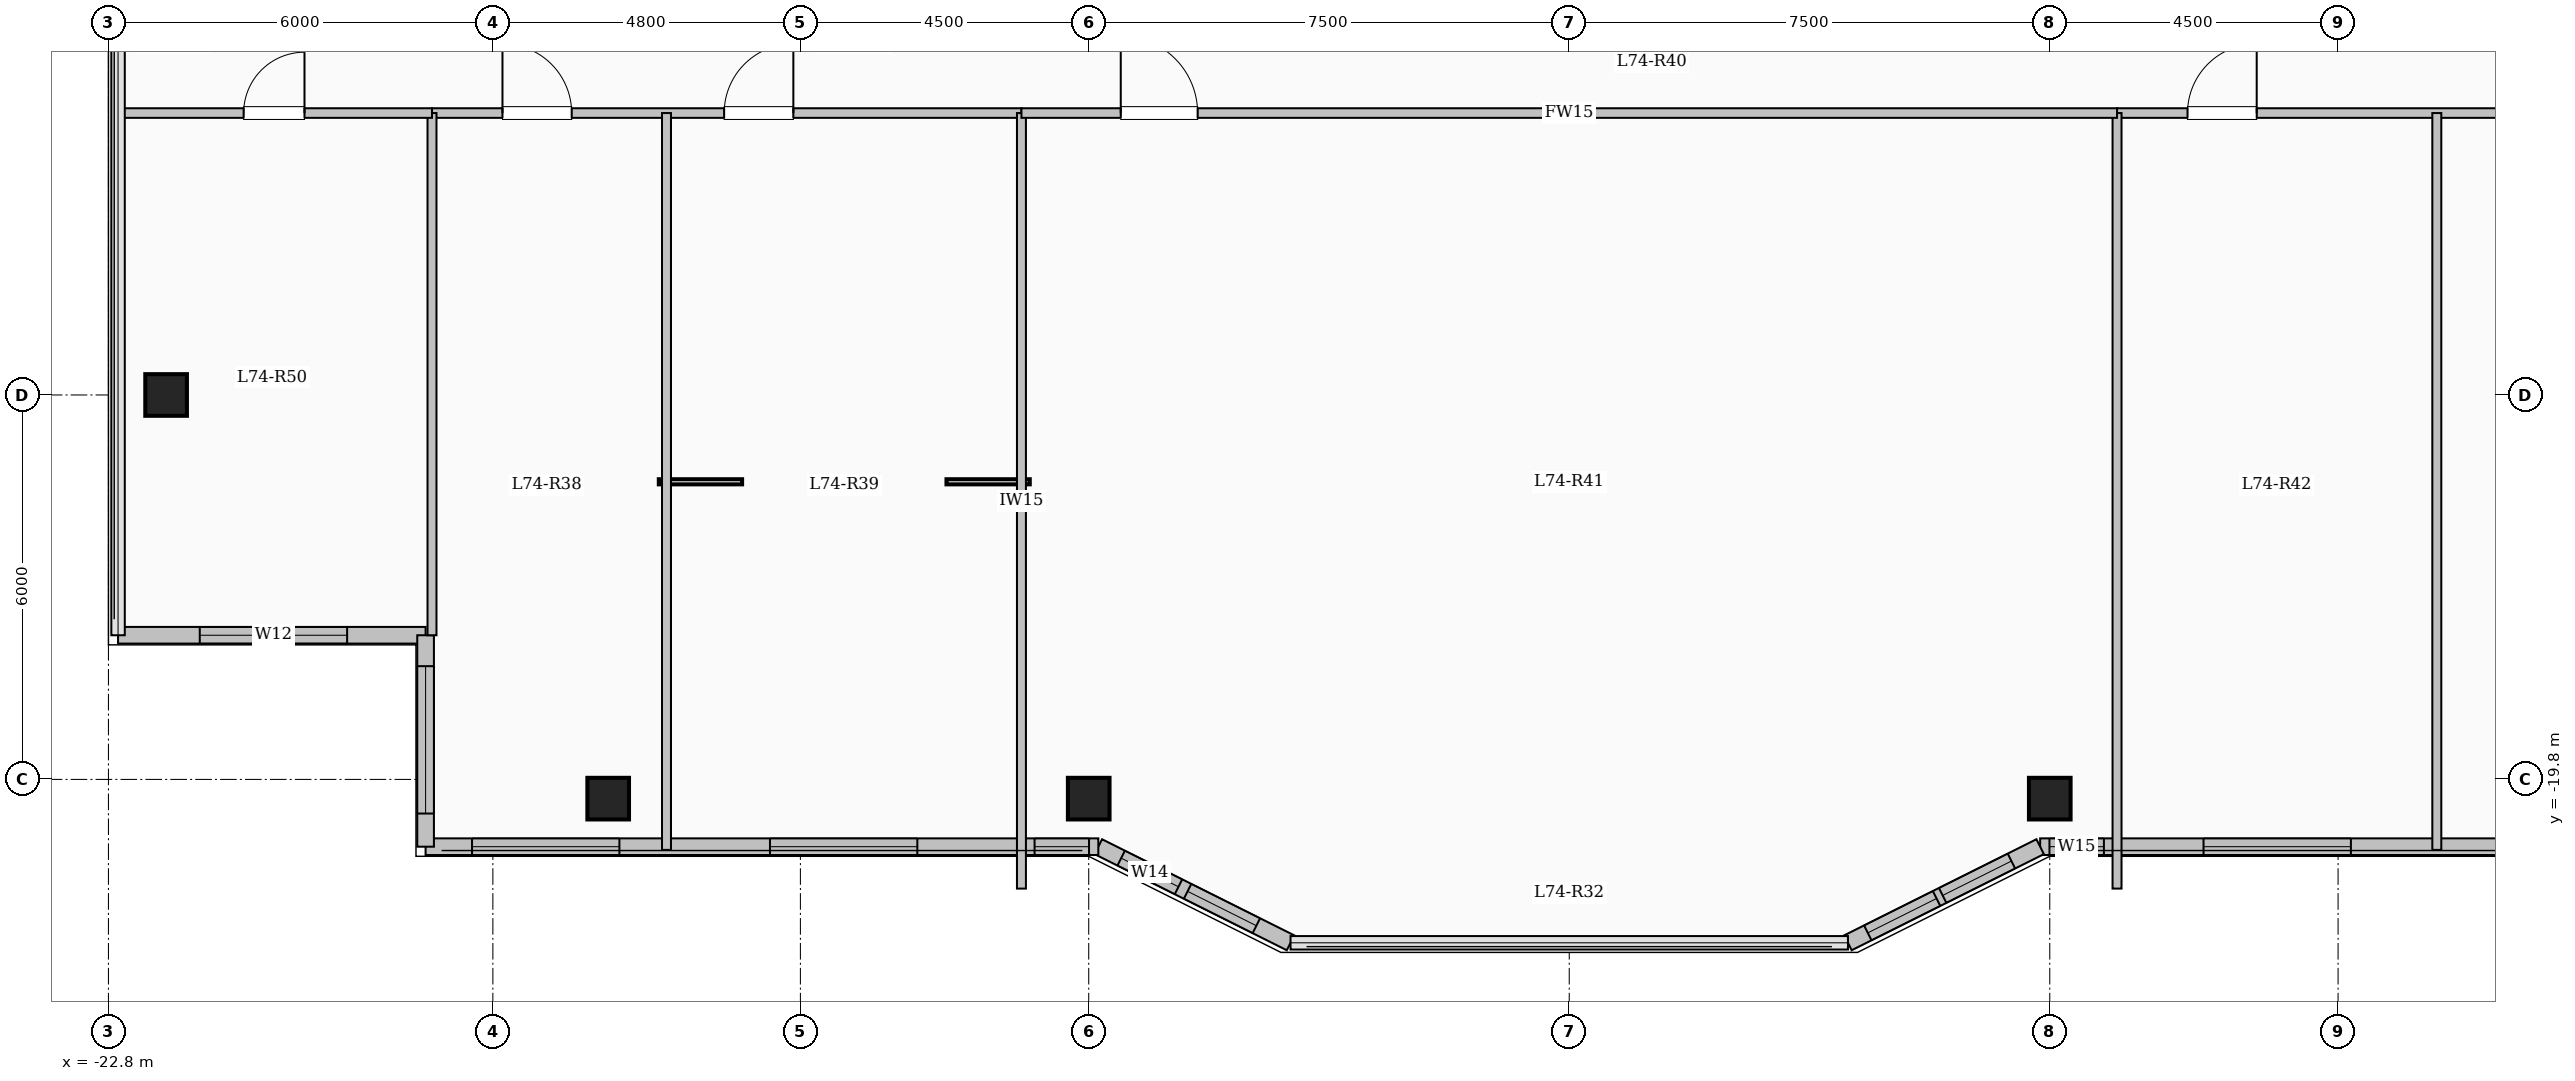
"""IFC4 building model, lengths in metres.
Left out: names, types, materials, properties, quantities, classifications, styles, units other than length and angle.
Written with IfcOpenShell. Run it as: python <this file> out.ifc"""

import sys

from ifc_helpers import new_model, si_unit, direction, frame, frame_2d, origin, origin_2d, place, context, subcontext, project, spatial, rectangle, extrude, element, fill, save


model = new_model("IFC4")
c1 = context("Model", 3, precision=1e-05, world=origin(), true_north=direction((0.0, 1.0)))
c2 = subcontext(c1, "Body", "Model", "MODEL_VIEW")
j1 = project(units=[si_unit("LENGTHUNIT", "METRE"), si_unit("PLANEANGLEUNIT", "RADIAN")], contexts=[c1])
p1 = place(None, origin())
s1 = spatial("IfcSite", under=j1, at=p1, CompositionType="ELEMENT")
p2 = place(p1, origin())
s2 = spatial("IfcBuilding", under=s1, at=p2, CompositionType="ELEMENT")
p3 = place(p2, frame((0.0, 0.0, 271.65)))
s3 = spatial("IfcBuildingStorey", under=s2, at=p3, CompositionType="ELEMENT", Elevation=271.65)
for number, where, z_axis, x_axis in (
    (1, (-15.0, -20.1, 0.0), (0.0, 0.0, 1.0), (1.0, 0.0, 0.0)),
    (2, (-7.5, -20.1, 0.0), (0.0, 0.0, 1.0), (1.0, 0.0, 0.0)),
    (3, (7.5, -20.1, 0.0), (0.0, 0.0, 1.0), (1.0, 0.0, 0.0)),
    (4, (-21.9, -13.8, 0.0), (0.0, 0.0, 1.0), (1.0, 0.0, 0.0)),
):
    element("IfcColumn", number, at=place(p3, frame(where, z_axis=z_axis, x_axis=x_axis)), inside=s3, PredefinedType="COLUMN", context=c2, shape_type="SweptSolid", body=[
        extrude(rectangle(XDim=0.65, YDim=0.65, at=origin_2d()), origin(), (0.0, 0.0, 1.0), 4.65),
    ])
p4 = place(p3, frame((-17.85, -17.55, 0.0), z_axis=(0.0, 0.0, 1.0), x_axis=(-1.0, 0.0, 0.0)))
e5 = element("IfcWall", 5, at=p4, inside=s3, PredefinedType="SOLIDWALL", context=c2, shape_type="SweptSolid", body=[
    extrude(rectangle(XDim=4.8, YDim=0.26, at=frame_2d((2.4, 0.0))), origin(), (0.0, 0.0, 1.0), 4.35),
])
p5 = place(p4, frame((1.225, 0.0, 0.85)))
e6 = element("IfcOpeningElement", 6, at=p5, cuts=e5, PredefinedType="OPENING", context=c2, shape_type="SweptSolid", body=[
    extrude(rectangle(XDim=2.3, YDim=2.2, at=frame_2d((1.15, 1.1))), frame((0.0, 0.14, 0.0), z_axis=(0.0, -1.0, 0.0), x_axis=(1.0, 0.0, 0.0)), (0.0, 0.0, 1.0), 0.28),
])
p6 = place(p3, frame((17.85, -20.85, 0.0), z_axis=(0.0, 0.0, 1.0), x_axis=(-1.0, 0.0, 0.0)))
e7 = element("IfcWall", 7, at=p6, inside=s3, PredefinedType="SOLIDWALL", context=c2, shape_type="SweptSolid", body=[
    extrude(rectangle(XDim=10.5, YDim=0.26, at=frame_2d((5.25, 0.0))), origin(), (0.0, 0.0, 1.0), 4.35),
])
p7 = place(p6, frame((1.0, 0.0, 0.85)))
e8 = element("IfcOpeningElement", 8, at=p7, cuts=e7, PredefinedType="OPENING", context=c2, shape_type="SweptSolid", body=[
    extrude(rectangle(XDim=2.3, YDim=2.2, at=frame_2d((1.15, 1.1))), frame((0.0, 0.14, 0.0), z_axis=(0.0, -1.0, 0.0), x_axis=(1.0, 0.0, 0.0)), (0.0, 0.0, 1.0), 0.28),
])
p8 = place(p6, frame((5.65, 0.0, 0.85)))
e9 = element("IfcOpeningElement", 9, at=p8, cuts=e7, PredefinedType="OPENING", context=c2, shape_type="SweptSolid", body=[
    extrude(rectangle(XDim=2.3, YDim=2.2, at=frame_2d((1.15, 1.1))), frame((0.0, 0.14, 0.0), z_axis=(0.0, -1.0, 0.0), x_axis=(1.0, 0.0, 0.0)), (0.0, 0.0, 1.0), 0.28),
])
p9 = place(p6, frame((9.505, 0.0, 0.95)))
e10 = element("IfcOpeningElement", 10, at=p9, cuts=e7, PredefinedType="OPENING", context=c2, shape_type="SweptSolid", body=[
    extrude(rectangle(XDim=0.85, YDim=1.5, at=frame_2d((0.425, 0.75))), frame((0.0, 0.14, 0.0), z_axis=(0.0, -1.0, 0.0), x_axis=(1.0, 0.0, 0.0)), (0.0, 0.0, 1.0), 0.28),
])
p10 = place(p3, frame((7.35, -20.85, 0.0), z_axis=(0.0, 0.0, 1.0), x_axis=(-0.894427191, -0.4472135955, 0.0)))
e11 = element("IfcWall", 11, at=p10, inside=s3, PredefinedType="SOLIDWALL", context=c2, shape_type="SweptSolid", body=[
    extrude(rectangle(XDim=3.354, YDim=0.26, at=frame_2d((1.677, 0.0))), origin(), (0.0, 0.0, 1.0), 4.35),
])
p11 = place(p10, frame((0.501, 0.0, 0.95)))
e12 = element("IfcOpeningElement", 12, at=p11, cuts=e11, PredefinedType="OPENING", context=c2, shape_type="SweptSolid", body=[
    extrude(rectangle(XDim=1.2, YDim=1.5, at=frame_2d((0.6, 0.75))), frame((0.0, 0.14, 0.0), z_axis=(0.0, -1.0, 0.0), x_axis=(1.0, 0.0, 0.0)), (0.0, 0.0, 1.0), 0.28),
])
p12 = place(p10, frame((1.808, 0.0, 0.95)))
e13 = element("IfcOpeningElement", 13, at=p12, cuts=e11, PredefinedType="OPENING", context=c2, shape_type="SweptSolid", body=[
    extrude(rectangle(XDim=1.2, YDim=1.5, at=frame_2d((0.6, 0.75))), frame((0.0, 0.14, 0.0), z_axis=(0.0, -1.0, 0.0), x_axis=(1.0, 0.0, 0.0)), (0.0, 0.0, 1.0), 0.28),
])
p13 = place(p3, frame((-4.35, -22.35, 0.0), z_axis=(0.0, 0.0, 1.0), x_axis=(-0.894427191, 0.4472135955, 0.0)))
e14 = element("IfcWall", 14, at=p13, inside=s3, PredefinedType="SOLIDWALL", context=c2, shape_type="SweptSolid", body=[
    extrude(rectangle(XDim=3.354, YDim=0.26, at=frame_2d((1.677, 0.0))), origin(), (0.0, 0.0, 1.0), 4.35),
])
p14 = place(p13, frame((0.596, 0.0, 0.95)))
e15 = element("IfcOpeningElement", 15, at=p14, cuts=e14, PredefinedType="OPENING", context=c2, shape_type="SweptSolid", body=[
    extrude(rectangle(XDim=1.2, YDim=1.5, at=frame_2d((0.6, 0.75))), frame((0.0, 0.14, 0.0), z_axis=(0.0, -1.0, 0.0), x_axis=(1.0, 0.0, 0.0)), (0.0, 0.0, 1.0), 0.28),
])
p15 = place(p13, frame((1.955, 0.0, 0.95)))
e16 = element("IfcOpeningElement", 16, at=p15, cuts=e14, PredefinedType="OPENING", context=c2, shape_type="SweptSolid", body=[
    extrude(rectangle(XDim=1.0, YDim=1.5, at=frame_2d((0.5, 0.75))), frame((0.0, 0.14, 0.0), z_axis=(0.0, -1.0, 0.0), x_axis=(1.0, 0.0, 0.0)), (0.0, 0.0, 1.0), 0.28),
])
p16 = place(p3, frame((-7.35, -20.85, 0.0), z_axis=(0.0, 0.0, 1.0), x_axis=(-1.0, 0.0, 0.0)))
e17 = element("IfcWall", 17, at=p16, inside=s3, PredefinedType="SOLIDWALL", context=c2, shape_type="SweptSolid", body=[
    extrude(rectangle(XDim=10.5, YDim=0.26, at=frame_2d((5.25, 0.0))), origin(), (0.0, 0.0, 1.0), 4.35),
])
p17 = place(p16, frame((0.145, 0.0, 0.95)))
e18 = element("IfcOpeningElement", 18, at=p17, cuts=e17, PredefinedType="OPENING", context=c2, shape_type="SweptSolid", body=[
    extrude(rectangle(XDim=0.85, YDim=1.5, at=frame_2d((0.425, 0.75))), frame((0.0, 0.14, 0.0), z_axis=(0.0, -1.0, 0.0), x_axis=(1.0, 0.0, 0.0)), (0.0, 0.0, 1.0), 0.28),
])
p18 = place(p16, frame((2.825, 0.0, 0.85)))
e19 = element("IfcOpeningElement", 19, at=p18, cuts=e17, PredefinedType="OPENING", context=c2, shape_type="SweptSolid", body=[
    extrude(rectangle(XDim=2.3, YDim=2.2, at=frame_2d((1.15, 1.1))), frame((0.0, 0.14, 0.0), z_axis=(0.0, -1.0, 0.0), x_axis=(1.0, 0.0, 0.0)), (0.0, 0.0, 1.0), 0.28),
])
p19 = place(p16, frame((7.475, 0.0, 0.85)))
e20 = element("IfcOpeningElement", 20, at=p19, cuts=e17, PredefinedType="OPENING", context=c2, shape_type="SweptSolid", body=[
    extrude(rectangle(XDim=2.3, YDim=2.2, at=frame_2d((1.15, 1.1))), frame((0.0, 0.14, 0.0), z_axis=(0.0, -1.0, 0.0), x_axis=(1.0, 0.0, 0.0)), (0.0, 0.0, 1.0), 0.28),
])
p20 = place(p3, frame((-17.85, -20.85, 0.0), z_axis=(0.0, 0.0, 1.0), x_axis=(0.0, 1.0, 0.0)))
e21 = element("IfcWall", 21, at=p20, inside=s3, PredefinedType="SOLIDWALL", context=c2, shape_type="SweptSolid", body=[
    extrude(rectangle(XDim=3.3, YDim=0.26, at=frame_2d((1.65, 0.0))), origin(), (0.0, 0.0, 1.0), 4.35),
])
p21 = place(p20, frame((0.518, 0.0, 0.85)))
e22 = element("IfcOpeningElement", 22, at=p21, cuts=e21, PredefinedType="OPENING", context=c2, shape_type="SweptSolid", body=[
    extrude(rectangle(XDim=2.3, YDim=2.2, at=frame_2d((1.15, 1.1))), frame((0.0, 0.14, 0.0), z_axis=(0.0, -1.0, 0.0), x_axis=(1.0, 0.0, 0.0)), (0.0, 0.0, 1.0), 0.28),
])
p22 = place(p3, frame((-17.75, -9.4, 0.0), z_axis=(0.0, 0.0, 1.0), x_axis=(1.0, 0.0, 0.0)))
e23 = element("IfcWall", 23, at=p22, inside=s3, PredefinedType="PARTITIONING", context=c2, shape_type="SweptSolid", body=[
    extrude(rectangle(XDim=9.2, YDim=0.15, at=frame_2d((4.6, 0.0))), origin(), (0.0, 0.0, 1.0), 4.35),
])
p23 = place(p22, frame((1.1, 0.0, 0.0)))
e24 = element("IfcOpeningElement", 24, at=p23, cuts=e23, PredefinedType="OPENING", context=c2, shape_type="SweptSolid", body=[
    extrude(rectangle(XDim=1.08, YDim=2.15, at=frame_2d((0.54, 1.075))), frame((0.0, 0.085, 0.0), z_axis=(0.0, -1.0, 0.0), x_axis=(1.0, 0.0, 0.0)), (0.0, 0.0, 1.0), 0.17),
])
p24 = place(p22, frame((4.56, 0.0, 0.0)))
e25 = element("IfcOpeningElement", 25, at=p24, cuts=e23, PredefinedType="OPENING", context=c2, shape_type="SweptSolid", body=[
    extrude(rectangle(XDim=1.08, YDim=2.15, at=frame_2d((0.54, 1.075))), frame((0.0, 0.085, 0.0), z_axis=(0.0, -1.0, 0.0), x_axis=(1.0, 0.0, 0.0)), (0.0, 0.0, 1.0), 0.17),
])
p25 = place(p3, frame((8.55, -9.4, 0.0), z_axis=(0.0, 0.0, 1.0), x_axis=(1.0, 0.0, 0.0)))
e26 = element("IfcWall", 26, at=p25, inside=s3, PredefinedType="PARTITIONING", context=c2, shape_type="SweptSolid", body=[
    extrude(rectangle(XDim=9.2, YDim=0.15, at=frame_2d((4.6, 0.0))), origin(), (0.0, 0.0, 1.0), 4.35),
])
p26 = place(p25, frame((1.1, 0.0, 0.0)))
e27 = element("IfcOpeningElement", 27, at=p26, cuts=e26, PredefinedType="OPENING", context=c2, shape_type="SweptSolid", body=[
    extrude(rectangle(XDim=1.08, YDim=2.15, at=frame_2d((0.54, 1.075))), frame((0.0, 0.085, 0.0), z_axis=(0.0, -1.0, 0.0), x_axis=(1.0, 0.0, 0.0)), (0.0, 0.0, 1.0), 0.17),
])
p27 = place(p25, frame((5.991, 0.0, 0.0)))
e28 = element("IfcOpeningElement", 28, at=p27, cuts=e26, PredefinedType="OPENING", context=c2, shape_type="SweptSolid", body=[
    extrude(rectangle(XDim=1.2, YDim=2.15, at=frame_2d((0.6, 1.075))), frame((0.0, 0.085, 0.0), z_axis=(0.0, -1.0, 0.0), x_axis=(1.0, 0.0, 0.0)), (0.0, 0.0, 1.0), 0.17),
])
p28 = place(p3, frame((-14.09, -20.9, 0.0), z_axis=(0.0, 0.0, 1.0), x_axis=(0.0, 1.0, 0.0)))
e29 = element("IfcWall", 29, at=p28, inside=s3, PredefinedType="PARTITIONING", context=c2, shape_type="SweptSolid", body=[
    extrude(rectangle(XDim=11.5, YDim=0.14, at=frame_2d((5.75, 0.0))), origin(), (0.0, 0.0, 1.0), 4.35),
])
for number, where, z_axis, x_axis in (
    (30, (-8.55, -21.504, 0.0), (0.0, 0.0, 1.0), (0.0, 1.0, 0.0)),
    (31, (8.55, -21.504, 0.0), (0.0, 0.0, 1.0), (0.0, 1.0, 0.0)),
):
    element("IfcWall", number, at=place(p3, frame(where, z_axis=z_axis, x_axis=x_axis)), inside=s3, PredefinedType="PARTITIONING", context=c2, shape_type="SweptSolid", body=[
        extrude(rectangle(XDim=12.104, YDim=0.14, at=frame_2d((6.052, 0.0))), origin(), (0.0, 0.0, 1.0), 4.35),
    ])
p29 = place(p3, frame((13.541, -20.9, 0.0), z_axis=(0.0, 0.0, 1.0), x_axis=(0.0, 1.0, 0.0)))
e32 = element("IfcWall", 32, at=p29, inside=s3, PredefinedType="PARTITIONING", context=c2, shape_type="SweptSolid", body=[
    extrude(rectangle(XDim=11.5, YDim=0.14, at=frame_2d((5.75, 0.0))), origin(), (0.0, 0.0, 1.0), 4.35),
])
p30 = place(p3, frame((-8.55, -9.4, 0.0), z_axis=(0.0, 0.0, 1.0), x_axis=(1.0, 0.0, 0.0)))
e33 = element("IfcWall", 33, at=p30, inside=s3, PredefinedType="PARTITIONING", context=c2, shape_type="SweptSolid", body=[
    extrude(rectangle(XDim=17.1, YDim=0.15, at=frame_2d((8.55, 0.0))), origin(), (0.0, 0.0, 1.0), 4.35),
])
p31 = place(p30, frame((1.55, 0.0, 0.0)))
e34 = element("IfcOpeningElement", 34, at=p31, cuts=e33, PredefinedType="OPENING", context=c2, shape_type="SweptSolid", body=[
    extrude(rectangle(XDim=1.2, YDim=2.15, at=frame_2d((0.6, 1.075))), frame((0.0, 0.085, 0.0), z_axis=(0.0, -1.0, 0.0), x_axis=(1.0, 0.0, 0.0)), (0.0, 0.0, 1.0), 0.17),
])
p32 = place(p3, frame((-17.75, -17.55, 0.0), z_axis=(0.0, 0.0, 1.0), x_axis=(0.0, 1.0, 0.0)))
e35 = element("IfcWall", 35, at=p32, inside=s3, PredefinedType="PARTITIONING", context=c2, shape_type="SweptSolid", body=[
    extrude(rectangle(XDim=8.15, YDim=0.14, at=frame_2d((4.075, 0.0))), origin(), (0.0, 0.0, 1.0), 4.35),
])
p33 = place(p3, frame((-22.68, -9.4, 0.0), z_axis=(0.0, 0.0, 1.0), x_axis=(1.0, 0.0, 0.0)))
e36 = element("IfcWall", 36, at=p33, inside=s3, PredefinedType="PARTITIONING", context=c2, shape_type="SweptSolid", body=[
    extrude(rectangle(XDim=4.93, YDim=0.15, at=frame_2d((2.465, 0.0))), origin(), (0.0, 0.0, 1.0), 4.35),
])
p34 = place(p33, frame((1.99, 0.0, 0.0)))
e37 = element("IfcOpeningElement", 37, at=p34, cuts=e36, PredefinedType="OPENING", context=c2, shape_type="SweptSolid", body=[
    extrude(rectangle(XDim=0.95, YDim=2.15, at=frame_2d((0.475, 1.075))), frame((0.0, 0.085, 0.0), z_axis=(0.0, -1.0, 0.0), x_axis=(1.0, 0.0, 0.0)), (0.0, 0.0, 1.0), 0.17),
])
p35 = place(p5, origin())
e38 = element("IfcWindow", 38, at=p35, inside=s3, PartitioningType="SINGLE_PANEL", PredefinedType="WINDOW", context=c2, shape_type="SweptSolid", body=[
    extrude(rectangle(XDim=2.3, YDim=2.2, at=frame_2d((1.15, 1.1))), frame((0.0, 0.03, 0.0), z_axis=(0.0, -1.0, 0.0), x_axis=(1.0, 0.0, 0.0)), (0.0, 0.0, 1.0), 0.06),
])
fill(e6, e38)
p36 = place(p8, origin())
e39 = element("IfcWindow", 39, at=p36, inside=s3, PartitioningType="SINGLE_PANEL", PredefinedType="WINDOW", context=c2, shape_type="SweptSolid", body=[
    extrude(rectangle(XDim=2.3, YDim=2.2, at=frame_2d((1.15, 1.1))), frame((0.0, 0.03, 0.0), z_axis=(0.0, -1.0, 0.0), x_axis=(1.0, 0.0, 0.0)), (0.0, 0.0, 1.0), 0.06),
])
fill(e9, e39)
p37 = place(p9, origin())
e40 = element("IfcWindow", 40, at=p37, inside=s3, PartitioningType="SINGLE_PANEL", PredefinedType="WINDOW", context=c2, shape_type="SweptSolid", body=[
    extrude(rectangle(XDim=0.85, YDim=1.5, at=frame_2d((0.425, 0.75))), frame((0.0, 0.03, 0.0), z_axis=(0.0, -1.0, 0.0), x_axis=(1.0, 0.0, 0.0)), (0.0, 0.0, 1.0), 0.06),
])
fill(e10, e40)
p38 = place(p11, origin())
e41 = element("IfcWindow", 41, at=p38, inside=s3, PartitioningType="SINGLE_PANEL", PredefinedType="WINDOW", context=c2, shape_type="SweptSolid", body=[
    extrude(rectangle(XDim=1.2, YDim=1.5, at=frame_2d((0.6, 0.75))), frame((0.0, 0.03, 0.0), z_axis=(0.0, -1.0, 0.0), x_axis=(1.0, 0.0, 0.0)), (0.0, 0.0, 1.0), 0.06),
])
fill(e12, e41)
p39 = place(p12, origin())
e42 = element("IfcWindow", 42, at=p39, inside=s3, PartitioningType="SINGLE_PANEL", PredefinedType="WINDOW", context=c2, shape_type="SweptSolid", body=[
    extrude(rectangle(XDim=1.2, YDim=1.5, at=frame_2d((0.6, 0.75))), frame((0.0, 0.03, 0.0), z_axis=(0.0, -1.0, 0.0), x_axis=(1.0, 0.0, 0.0)), (0.0, 0.0, 1.0), 0.06),
])
fill(e13, e42)
p40 = place(p14, origin())
e43 = element("IfcWindow", 43, at=p40, inside=s3, PartitioningType="SINGLE_PANEL", PredefinedType="WINDOW", context=c2, shape_type="SweptSolid", body=[
    extrude(rectangle(XDim=1.2, YDim=1.5, at=frame_2d((0.6, 0.75))), frame((0.0, 0.03, 0.0), z_axis=(0.0, -1.0, 0.0), x_axis=(1.0, 0.0, 0.0)), (0.0, 0.0, 1.0), 0.06),
])
fill(e15, e43)
p41 = place(p15, origin())
e44 = element("IfcWindow", 44, at=p41, inside=s3, PartitioningType="SINGLE_PANEL", PredefinedType="WINDOW", context=c2, shape_type="SweptSolid", body=[
    extrude(rectangle(XDim=1.0, YDim=1.5, at=frame_2d((0.5, 0.75))), frame((0.0, 0.03, 0.0), z_axis=(0.0, -1.0, 0.0), x_axis=(1.0, 0.0, 0.0)), (0.0, 0.0, 1.0), 0.06),
])
fill(e16, e44)
p42 = place(p17, origin())
e45 = element("IfcWindow", 45, at=p42, inside=s3, PartitioningType="SINGLE_PANEL", PredefinedType="WINDOW", context=c2, shape_type="SweptSolid", body=[
    extrude(rectangle(XDim=0.85, YDim=1.5, at=frame_2d((0.425, 0.75))), frame((0.0, 0.03, 0.0), z_axis=(0.0, -1.0, 0.0), x_axis=(1.0, 0.0, 0.0)), (0.0, 0.0, 1.0), 0.06),
])
fill(e18, e45)
p43 = place(p18, origin())
e46 = element("IfcWindow", 46, at=p43, inside=s3, PartitioningType="SINGLE_PANEL", PredefinedType="WINDOW", context=c2, shape_type="SweptSolid", body=[
    extrude(rectangle(XDim=2.3, YDim=2.2, at=frame_2d((1.15, 1.1))), frame((0.0, 0.03, 0.0), z_axis=(0.0, -1.0, 0.0), x_axis=(1.0, 0.0, 0.0)), (0.0, 0.0, 1.0), 0.06),
])
fill(e19, e46)
p44 = place(p19, origin())
e47 = element("IfcWindow", 47, at=p44, inside=s3, PartitioningType="SINGLE_PANEL", PredefinedType="WINDOW", context=c2, shape_type="SweptSolid", body=[
    extrude(rectangle(XDim=2.3, YDim=2.2, at=frame_2d((1.15, 1.1))), frame((0.0, 0.03, 0.0), z_axis=(0.0, -1.0, 0.0), x_axis=(1.0, 0.0, 0.0)), (0.0, 0.0, 1.0), 0.06),
])
fill(e20, e47)
p45 = place(p21, origin())
e48 = element("IfcWindow", 48, at=p45, inside=s3, PartitioningType="SINGLE_PANEL", PredefinedType="WINDOW", context=c2, shape_type="SweptSolid", body=[
    extrude(rectangle(XDim=2.3, YDim=2.2, at=frame_2d((1.15, 1.1))), frame((0.0, 0.03, 0.0), z_axis=(0.0, -1.0, 0.0), x_axis=(1.0, 0.0, 0.0)), (0.0, 0.0, 1.0), 0.06),
])
fill(e22, e48)
p46 = place(p23, origin())
e49 = element("IfcDoor", 49, at=p46, inside=s3, OperationType="SINGLE_SWING_LEFT", PredefinedType="DOOR", context=c2, shape_type="SweptSolid", body=[
    extrude(rectangle(XDim=1.08, YDim=2.15, at=frame_2d((0.54, 1.075))), frame((0.0, 0.025, 0.0), z_axis=(0.0, -1.0, 0.0), x_axis=(1.0, 0.0, 0.0)), (0.0, 0.0, 1.0), 0.05),
])
fill(e24, e49)
p47 = place(p24, origin())
e50 = element("IfcDoor", 50, at=p47, inside=s3, OperationType="SINGLE_SWING_RIGHT", PredefinedType="DOOR", context=c2, shape_type="SweptSolid", body=[
    extrude(rectangle(XDim=1.08, YDim=2.15, at=frame_2d((0.54, 1.075))), frame((0.0, 0.025, 0.0), z_axis=(0.0, -1.0, 0.0), x_axis=(1.0, 0.0, 0.0)), (0.0, 0.0, 1.0), 0.05),
])
fill(e25, e50)
p48 = place(p31, origin())
e51 = element("IfcDoor", 51, at=p48, inside=s3, OperationType="SINGLE_SWING_LEFT", PredefinedType="DOOR", context=c2, shape_type="SweptSolid", body=[
    extrude(rectangle(XDim=1.2, YDim=2.15, at=frame_2d((0.6, 1.075))), frame((0.0, 0.025, 0.0), z_axis=(0.0, -1.0, 0.0), x_axis=(1.0, 0.0, 0.0)), (0.0, 0.0, 1.0), 0.05),
])
fill(e34, e51)
p49 = place(p26, origin())
e52 = element("IfcDoor", 52, at=p49, inside=s3, OperationType="SINGLE_SWING_RIGHT", PredefinedType="DOOR", context=c2, shape_type="SweptSolid", body=[
    extrude(rectangle(XDim=1.08, YDim=2.15, at=frame_2d((0.54, 1.075))), frame((0.0, 0.025, 0.0), z_axis=(0.0, -1.0, 0.0), x_axis=(1.0, 0.0, 0.0)), (0.0, 0.0, 1.0), 0.05),
])
fill(e27, e52)
p50 = place(p34, origin())
e53 = element("IfcDoor", 53, at=p50, inside=s3, OperationType="SINGLE_SWING_RIGHT", PredefinedType="DOOR", context=c2, shape_type="SweptSolid", body=[
    extrude(rectangle(XDim=0.95, YDim=2.15, at=frame_2d((0.475, 1.075))), frame((0.0, 0.025, 0.0), z_axis=(0.0, -1.0, 0.0), x_axis=(1.0, 0.0, 0.0)), (0.0, 0.0, 1.0), 0.05),
])
fill(e37, e53)
save(model, sys.argv[1])
